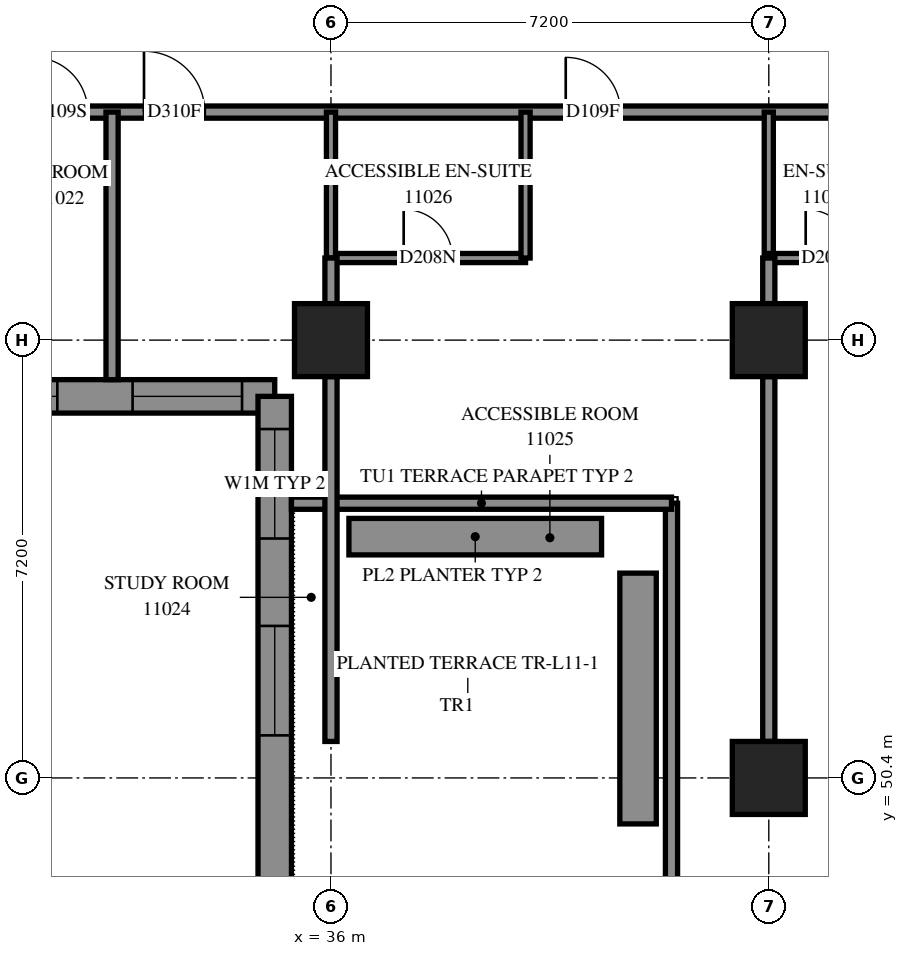
"""IFC4 building model, lengths in metres.
Left out: names, types, materials, properties, quantities, classifications, styles, units other than length and angle.
Written with IfcOpenShell. Run it as: python <this file> out.ifc"""

import sys

from ifc_helpers import new_model, si_unit, direction, frame, frame_2d, origin, origin_2d, place, context, subcontext, project, spatial, polyline, rectangle, outline, extrude, element, fill, save


model = new_model("IFC4")
c1 = context("Model", 3, precision=1e-05, world=origin(), true_north=direction((0.0, 1.0)))
c2 = subcontext(c1, "Body", "Model", "MODEL_VIEW")
j1 = project(units=[si_unit("LENGTHUNIT", "METRE"), si_unit("PLANEANGLEUNIT", "RADIAN")], contexts=[c1])
p1 = place(None, origin())
s1 = spatial("IfcSite", under=j1, at=p1, CompositionType="ELEMENT")
p2 = place(p1, origin())
s2 = spatial("IfcBuilding", under=s1, at=p2, CompositionType="ELEMENT")
p3 = place(p2, frame((0.0, 0.0, 44.0)))
s3 = spatial("IfcBuildingStorey", under=s2, at=p3, CompositionType="ELEMENT", Elevation=44.0)
for number, where, z_axis, x_axis in (
    (1, (36.0, 57.6, 0.0), (0.0, 0.0, 1.0), (1.0, 0.0, 0.0)),
    (2, (43.2, 50.4, 0.0), (0.0, 0.0, 1.0), (1.0, 0.0, 0.0)),
    (3, (43.2, 57.6, 0.0), (0.0, 0.0, 1.0), (1.0, 0.0, 0.0)),
):
    element("IfcColumn", number, at=place(p3, frame(where, z_axis=z_axis, x_axis=x_axis)), inside=s3, PredefinedType="COLUMN", context=c2, shape_type="SweptSolid", body=[
        extrude(rectangle(XDim=1.2, YDim=1.2, at=origin_2d()), origin(), (0.0, 0.0, 1.0), 3.1),
    ])
p4 = place(p3, frame((27.875, 56.675, 0.0), z_axis=(0.0, 0.0, 1.0), x_axis=(1.0, 0.0, 0.0)))
e4 = element("IfcWall", 4, at=p4, inside=s3, PredefinedType="SOLIDWALL", context=c2, shape_type="SweptSolid", body=[
    extrude(outline(polyline([(-0.275, -0.275), (6.925, -0.275), (7.475, 0.275), (0.275, 0.275), (-0.275, -0.275)])), origin(), (0.0, 0.0, 1.0), 3.1),
])
p5 = place(p4, frame((1.825, 0.0, 0.6)))
e5 = element("IfcOpeningElement", 5, at=p5, cuts=e4, PredefinedType="OPENING", context=c2, shape_type="SweptSolid", body=[
    extrude(rectangle(XDim=1.8, YDim=1.9, at=frame_2d((0.9, 0.95))), frame((0.0, 0.285, 0.0), z_axis=(0.0, -1.0, 0.0), x_axis=(1.0, 0.0, 0.0)), (0.0, 0.0, 1.0), 0.57),
])
p6 = place(p4, frame((4.862, 0.0, 0.6)))
e6 = element("IfcOpeningElement", 6, at=p6, cuts=e4, PredefinedType="OPENING", context=c2, shape_type="SweptSolid", body=[
    extrude(rectangle(XDim=1.8, YDim=1.9, at=frame_2d((0.9, 0.95))), frame((0.0, 0.285, 0.0), z_axis=(0.0, -1.0, 0.0), x_axis=(1.0, 0.0, 0.0)), (0.0, 0.0, 1.0), 0.57),
])
p7 = place(p3, frame((35.075, 56.675, 0.0), z_axis=(0.0, 0.0, 1.0), x_axis=(0.0, -1.0, 0.0)))
e7 = element("IfcWall", 7, at=p7, inside=s3, PredefinedType="SOLIDWALL", context=c2, shape_type="SweptSolid", body=[
    extrude(outline(polyline([(0.275, -0.275), (8.526, -0.275), (7.976, 0.275), (-0.275, 0.275), (0.275, -0.275)])), origin(), (0.0, 0.0, 1.0), 3.1),
])
p8 = place(p7, frame((0.537, 0.0, 0.7)))
e8 = element("IfcOpeningElement", 8, at=p8, cuts=e7, PredefinedType="OPENING", context=c2, shape_type="SweptSolid", body=[
    extrude(rectangle(XDim=1.8, YDim=1.8, at=frame_2d((0.9, 0.9))), frame((0.0, 0.285, 0.0), z_axis=(0.0, -1.0, 0.0), x_axis=(1.0, 0.0, 0.0)), (0.0, 0.0, 1.0), 0.57),
])
p9 = place(p7, frame((3.775, 0.0, 0.7)))
e9 = element("IfcOpeningElement", 9, at=p9, cuts=e7, PredefinedType="OPENING", context=c2, shape_type="SweptSolid", body=[
    extrude(rectangle(XDim=1.8, YDim=1.8, at=frame_2d((0.9, 0.9))), frame((0.0, 0.285, 0.0), z_axis=(0.0, -1.0, 0.0), x_axis=(1.0, 0.0, 0.0)), (0.0, 0.0, 1.0), 0.57),
])
p10 = place(p3, frame((41.6, 48.699, 0.0), z_axis=(0.0, 0.0, 1.0), x_axis=(0.0, 1.0, 0.0)))
e10 = element("IfcWall", 10, at=p10, inside=s3, PredefinedType="PARAPET", context=c2, shape_type="SweptSolid", body=[
    extrude(outline(polyline([(0.0, -0.1), (6.319, -0.1), (6.119, 0.1), (0.0, 0.1), (0.0, -0.1)])), origin(), (0.0, 0.0, 1.0), 0.25),
])
p11 = place(p3, frame((41.6, 54.918, 0.0), z_axis=(0.0, 0.0, 1.0), x_axis=(-1.0, 0.0, 0.0)))
e11 = element("IfcWall", 11, at=p11, inside=s3, PredefinedType="PARAPET", context=c2, shape_type="SweptSolid", body=[
    extrude(outline(polyline([(-0.1, -0.1), (6.25, -0.1), (6.25, 0.1), (0.1, 0.1), (-0.1, -0.1)])), origin(), (0.0, 0.0, 1.0), 0.25),
])
p12 = place(p3, frame((28.8, 61.35, 0.0), z_axis=(0.0, 0.0, 1.0), x_axis=(1.0, 0.0, 0.0)))
e12 = element("IfcWall", 12, at=p12, inside=s3, PredefinedType="PARTITIONING", context=c2, shape_type="SweptSolid", body=[
    extrude(rectangle(XDim=24.15, YDim=0.2, at=frame_2d((12.075, 0.0))), origin(), (0.0, 0.0, 1.0), 3.1),
])
p13 = place(p12, frame((2.3, 0.0, 0.0)))
e13 = element("IfcOpeningElement", 13, at=p13, cuts=e12, PredefinedType="OPENING", context=c2, shape_type="SweptSolid", body=[
    extrude(rectangle(XDim=0.9, YDim=2.1, at=frame_2d((0.45, 1.05))), frame((0.0, 0.11, 0.0), z_axis=(0.0, -1.0, 0.0), x_axis=(1.0, 0.0, 0.0)), (0.0, 0.0, 1.0), 0.22),
])
p14 = place(p12, frame((4.125, 0.0, 0.0)))
e14 = element("IfcOpeningElement", 14, at=p14, cuts=e12, PredefinedType="OPENING", context=c2, shape_type="SweptSolid", body=[
    extrude(rectangle(XDim=1.0, YDim=2.1, at=frame_2d((0.5, 1.05))), frame((0.0, 0.11, 0.0), z_axis=(0.0, -1.0, 0.0), x_axis=(1.0, 0.0, 0.0)), (0.0, 0.0, 1.0), 0.22),
])
p15 = place(p12, frame((11.061, 0.0, 0.0)))
e15 = element("IfcOpeningElement", 15, at=p15, cuts=e12, PredefinedType="OPENING", context=c2, shape_type="SweptSolid", body=[
    extrude(rectangle(XDim=0.9, YDim=2.1, at=frame_2d((0.45, 1.05))), frame((0.0, 0.11, 0.0), z_axis=(0.0, -1.0, 0.0), x_axis=(1.0, 0.0, 0.0)), (0.0, 0.0, 1.0), 0.22),
])
p16 = place(p12, frame((16.7, 0.0, 0.0)))
e16 = element("IfcOpeningElement", 16, at=p16, cuts=e12, PredefinedType="OPENING", context=c2, shape_type="SweptSolid", body=[
    extrude(rectangle(XDim=0.9, YDim=2.1, at=frame_2d((0.45, 1.05))), frame((0.0, 0.11, 0.0), z_axis=(0.0, -1.0, 0.0), x_axis=(1.0, 0.0, 0.0)), (0.0, 0.0, 1.0), 0.22),
])
p17 = place(p12, frame((18.508, 0.0, 0.0)))
e17 = element("IfcOpeningElement", 17, at=p17, cuts=e12, PredefinedType="OPENING", context=c2, shape_type="SweptSolid", body=[
    extrude(rectangle(XDim=1.0, YDim=2.1, at=frame_2d((0.5, 1.05))), frame((0.0, 0.11, 0.0), z_axis=(0.0, -1.0, 0.0), x_axis=(1.0, 0.0, 0.0)), (0.0, 0.0, 1.0), 0.22),
])
p18 = place(p12, frame((22.882, 0.0, 0.0)))
e18 = element("IfcOpeningElement", 18, at=p18, cuts=e12, PredefinedType="OPENING", context=c2, shape_type="SweptSolid", body=[
    extrude(rectangle(XDim=1.0, YDim=2.1, at=frame_2d((0.5, 1.05))), frame((0.0, 0.11, 0.0), z_axis=(0.0, -1.0, 0.0), x_axis=(1.0, 0.0, 0.0)), (0.0, 0.0, 1.0), 0.22),
])
p19 = place(p3, frame((36.0, 51.0, 0.0), z_axis=(0.0, 0.0, 1.0), x_axis=(0.0, 1.0, 0.0)))
e19 = element("IfcWall", 19, at=p19, inside=s3, PredefinedType="PARTITIONING", context=c2, shape_type="SweptSolid", body=[
    extrude(rectangle(XDim=6.0, YDim=0.2, at=frame_2d((3.0, 0.0))), origin(), (0.0, 0.0, 1.0), 3.1),
])
p20 = place(p3, frame((43.2, 51.0, 0.0), z_axis=(0.0, 0.0, 1.0), x_axis=(0.0, 1.0, 0.0)))
e20 = element("IfcWall", 20, at=p20, inside=s3, PredefinedType="PARTITIONING", context=c2, shape_type="SweptSolid", body=[
    extrude(rectangle(XDim=6.0, YDim=0.2, at=frame_2d((3.0, 0.0))), origin(), (0.0, 0.0, 1.0), 2.6),
])
p21 = place(p3, frame((32.4, 56.95, 0.0), z_axis=(0.0, 0.0, 1.0), x_axis=(0.0, 1.0, 0.0)))
e21 = element("IfcWall", 21, at=p21, inside=s3, PredefinedType="PARTITIONING", context=c2, shape_type="SweptSolid", body=[
    extrude(rectangle(XDim=4.4, YDim=0.2, at=frame_2d((2.2, 0.0))), origin(), (0.0, 0.0, 1.0), 3.1),
])
p22 = place(p3, frame((36.0, 58.95, 0.0), z_axis=(0.0, 0.0, 1.0), x_axis=(1.0, 0.0, 0.0)))
e22 = element("IfcWall", 22, at=p22, inside=s3, PredefinedType="PARTITIONING", context=c2, shape_type="SweptSolid", body=[
    extrude(rectangle(XDim=3.2, YDim=0.15, at=frame_2d((1.6, 0.0))), origin(), (0.0, 0.0, 1.0), 3.1),
])
p23 = place(p22, frame((1.196, 0.0, 0.0)))
e23 = element("IfcOpeningElement", 23, at=p23, cuts=e22, PredefinedType="OPENING", context=c2, shape_type="SweptSolid", body=[
    extrude(rectangle(XDim=0.8, YDim=2.1, at=frame_2d((0.4, 1.05))), frame((0.0, 0.085, 0.0), z_axis=(0.0, -1.0, 0.0), x_axis=(1.0, 0.0, 0.0)), (0.0, 0.0, 1.0), 0.17),
])
for number, where, z_axis, x_axis in (
    (24, (39.2, 58.95, 0.0), (0.0, 0.0, 1.0), (0.0, 1.0, 0.0)),
    (25, (36.0, 58.95, 0.0), (0.0, 0.0, 1.0), (0.0, 1.0, 0.0)),
    (26, (43.2, 58.95, 0.0), (0.0, 0.0, 1.0), (0.0, 1.0, 0.0)),
):
    element("IfcWall", number, at=place(p3, frame(where, z_axis=z_axis, x_axis=x_axis)), inside=s3, PredefinedType="PARTITIONING", context=c2, shape_type="SweptSolid", body=[
        extrude(rectangle(XDim=2.4, YDim=0.15, at=frame_2d((1.2, 0.0))), origin(), (0.0, 0.0, 1.0), 3.1),
    ])
p24 = place(p3, frame((43.2, 58.95, 0.0), z_axis=(0.0, 0.0, 1.0), x_axis=(1.0, 0.0, 0.0)))
e27 = element("IfcWall", 27, at=p24, inside=s3, PredefinedType="PARTITIONING", context=c2, shape_type="SweptSolid", body=[
    extrude(rectangle(XDim=1.9, YDim=0.15, at=frame_2d((0.95, 0.0))), origin(), (0.0, 0.0, 1.0), 3.1),
])
p25 = place(p24, frame((0.607, 0.0, 0.0)))
e28 = element("IfcOpeningElement", 28, at=p25, cuts=e27, PredefinedType="OPENING", context=c2, shape_type="SweptSolid", body=[
    extrude(rectangle(XDim=0.8, YDim=2.1, at=frame_2d((0.4, 1.05))), frame((0.0, 0.085, 0.0), z_axis=(0.0, -1.0, 0.0), x_axis=(1.0, 0.0, 0.0)), (0.0, 0.0, 1.0), 0.17),
])
for number, where, z_axis, x_axis in (
    (29, (36.0, 58.2, 0.0), (0.0, 0.0, 1.0), (0.0, 1.0, 0.0)),
    (30, (43.2, 58.2, 0.0), (0.0, 0.0, 1.0), (0.0, 1.0, 0.0)),
):
    element("IfcWall", number, at=place(p3, frame(where, z_axis=z_axis, x_axis=x_axis)), inside=s3, PredefinedType="PARTITIONING", context=c2, shape_type="SweptSolid", body=[
        extrude(rectangle(XDim=0.75, YDim=0.2, at=frame_2d((0.375, 0.0))), origin(), (0.0, 0.0, 1.0), 3.1),
    ])
p26 = place(p3, frame((41.05, 49.644, 0.0), z_axis=(0.0, 0.0, 1.0), x_axis=(0.0, 1.0, 0.0)))
e31 = element("IfcWall", 31, at=p26, inside=s3, PredefinedType="SOLIDWALL", context=c2, shape_type="SweptSolid", body=[
    extrude(outline(polyline([(0.0, -0.3), (4.124, -0.3), (4.124, 0.3), (0.0, 0.3), (0.0, -0.3)])), origin(), (0.0, 0.0, 1.0), 0.65),
])
p27 = place(p3, frame((40.45, 54.368, 0.0), z_axis=(0.0, 0.0, 1.0), x_axis=(-1.0, 0.0, 0.0)))
e32 = element("IfcWall", 32, at=p27, inside=s3, PredefinedType="SOLIDWALL", context=c2, shape_type="SweptSolid", body=[
    extrude(outline(polyline([(0.0, -0.3), (4.155, -0.3), (4.155, 0.3), (0.0, 0.3), (0.0, -0.3)])), origin(), (0.0, 0.0, 1.0), 0.65),
])
p28 = place(p5, origin())
e33 = element("IfcWindow", 33, at=p28, inside=s3, PartitioningType="SINGLE_PANEL", PredefinedType="WINDOW", context=c2, shape_type="SweptSolid", body=[
    extrude(rectangle(XDim=1.8, YDim=1.9, at=frame_2d((0.9, 0.95))), frame((0.0, 0.155, 0.0), z_axis=(0.0, -1.0, 0.0), x_axis=(1.0, 0.0, 0.0)), (0.0, 0.0, 1.0), 0.06),
])
fill(e5, e33)
p29 = place(p6, origin())
e34 = element("IfcWindow", 34, at=p29, inside=s3, PartitioningType="SINGLE_PANEL", PredefinedType="WINDOW", context=c2, shape_type="SweptSolid", body=[
    extrude(rectangle(XDim=1.8, YDim=1.9, at=frame_2d((0.9, 0.95))), frame((0.0, 0.155, 0.0), z_axis=(0.0, -1.0, 0.0), x_axis=(1.0, 0.0, 0.0)), (0.0, 0.0, 1.0), 0.06),
])
fill(e6, e34)
p30 = place(p8, origin())
e35 = element("IfcWindow", 35, at=p30, inside=s3, PartitioningType="SINGLE_PANEL", PredefinedType="WINDOW", context=c2, shape_type="SweptSolid", body=[
    extrude(rectangle(XDim=1.8, YDim=1.8, at=frame_2d((0.9, 0.9))), frame((0.0, 0.155, 0.0), z_axis=(0.0, -1.0, 0.0), x_axis=(1.0, 0.0, 0.0)), (0.0, 0.0, 1.0), 0.06),
])
fill(e8, e35)
p31 = place(p9, origin())
e36 = element("IfcWindow", 36, at=p31, inside=s3, PartitioningType="SINGLE_PANEL", PredefinedType="WINDOW", context=c2, shape_type="SweptSolid", body=[
    extrude(rectangle(XDim=1.8, YDim=1.8, at=frame_2d((0.9, 0.9))), frame((0.0, 0.155, 0.0), z_axis=(0.0, -1.0, 0.0), x_axis=(1.0, 0.0, 0.0)), (0.0, 0.0, 1.0), 0.06),
])
fill(e9, e36)
p32 = place(p13, origin())
e37 = element("IfcDoor", 37, at=p32, inside=s3, OperationType="SINGLE_SWING_LEFT", PredefinedType="DOOR", context=c2, shape_type="SweptSolid", body=[
    extrude(rectangle(XDim=0.9, YDim=2.1, at=frame_2d((0.45, 1.05))), frame((0.0, 0.025, 0.0), z_axis=(0.0, -1.0, 0.0), x_axis=(1.0, 0.0, 0.0)), (0.0, 0.0, 1.0), 0.05),
])
fill(e13, e37)
p33 = place(p14, origin())
e38 = element("IfcDoor", 38, at=p33, inside=s3, OperationType="SINGLE_SWING_RIGHT", PredefinedType="DOOR", context=c2, shape_type="SweptSolid", body=[
    extrude(rectangle(XDim=1.0, YDim=2.1, at=frame_2d((0.5, 1.05))), frame((0.0, 0.025, 0.0), z_axis=(0.0, -1.0, 0.0), x_axis=(1.0, 0.0, 0.0)), (0.0, 0.0, 1.0), 0.05),
])
fill(e14, e38)
p34 = place(p15, origin())
e39 = element("IfcDoor", 39, at=p34, inside=s3, OperationType="SINGLE_SWING_LEFT", PredefinedType="DOOR", context=c2, shape_type="SweptSolid", body=[
    extrude(rectangle(XDim=0.9, YDim=2.1, at=frame_2d((0.45, 1.05))), frame((0.0, 0.025, 0.0), z_axis=(0.0, -1.0, 0.0), x_axis=(1.0, 0.0, 0.0)), (0.0, 0.0, 1.0), 0.05),
])
fill(e15, e39)
p35 = place(p23, origin())
e40 = element("IfcDoor", 40, at=p35, inside=s3, OperationType="SINGLE_SWING_RIGHT", PredefinedType="DOOR", context=c2, shape_type="SweptSolid", body=[
    extrude(rectangle(XDim=0.8, YDim=2.1, at=frame_2d((0.4, 1.05))), frame((0.0, 0.025, 0.0), z_axis=(0.0, -1.0, 0.0), x_axis=(1.0, 0.0, 0.0)), (0.0, 0.0, 1.0), 0.05),
])
fill(e23, e40)
p36 = place(p25, origin())
e41 = element("IfcDoor", 41, at=p36, inside=s3, OperationType="SINGLE_SWING_RIGHT", PredefinedType="DOOR", context=c2, shape_type="SweptSolid", body=[
    extrude(rectangle(XDim=0.8, YDim=2.1, at=frame_2d((0.4, 1.05))), frame((0.0, 0.025, 0.0), z_axis=(0.0, -1.0, 0.0), x_axis=(1.0, 0.0, 0.0)), (0.0, 0.0, 1.0), 0.05),
])
fill(e28, e41)
save(model, sys.argv[1])
